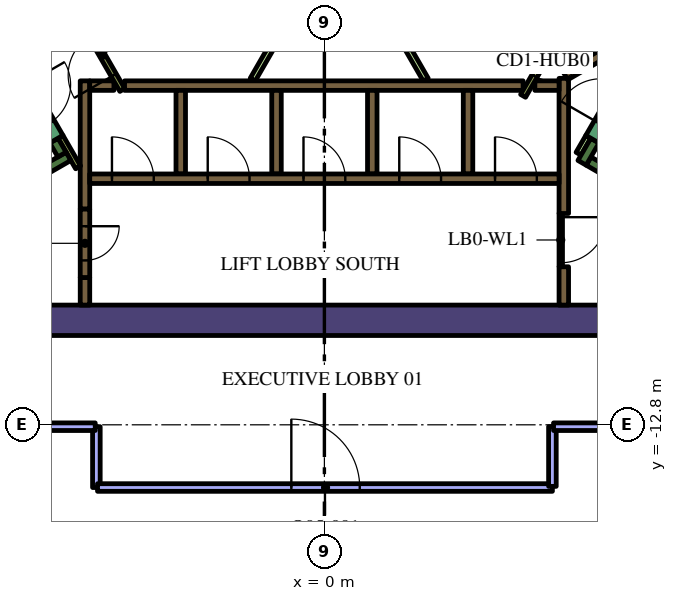
"""IFC4 building model, lengths in metres.
Left out: names, types, materials, properties, quantities, classifications, styles, units other than length and angle.
Written with IfcOpenShell. Run it as: python <this file> out.ifc"""

import sys

from ifc_helpers import new_model, si_unit, direction, frame, frame_2d, origin, place, context, subcontext, project, spatial, rectangle, extrude, element, fill, save


model = new_model("IFC4")
c1 = context("Model", 3, precision=1e-05, world=origin(), true_north=direction((0.0, 1.0)))
c2 = subcontext(c1, "Body", "Model", "MODEL_VIEW")
j1 = project(units=[si_unit("LENGTHUNIT", "METRE"), si_unit("PLANEANGLEUNIT", "RADIAN")], contexts=[c1])
p1 = place(None, origin())
s1 = spatial("IfcSite", under=j1, at=p1, CompositionType="ELEMENT")
p2 = place(p1, origin())
s2 = spatial("IfcBuilding", under=s1, at=p2, CompositionType="ELEMENT")
p3 = place(p2, frame((0.0, 0.0, 192.0)))
s3 = spatial("IfcBuildingStorey", under=s2, at=p3, CompositionType="ELEMENT", Elevation=192.0)
p4 = place(p3, frame((-13.378, -10.05, 0.0), z_axis=(0.0, 0.0, 1.0), x_axis=(1.0, 0.0, 0.0)))
e1 = element("IfcWall", 1, at=p4, inside=s3, PredefinedType="SOLIDWALL", context=c2, shape_type="SweptSolid", body=[
    extrude(rectangle(XDim=22.282, YDim=0.8, at=frame_2d((11.141, 0.0))), origin(), (0.0, 0.0, 1.0), 4.2),
])
p5 = place(p3, frame((12.84, -9.261, 0.0), z_axis=(0.0, 0.0, 1.0), x_axis=(-0.866013990052, 0.500019768644, 0.0)))
e2 = element("IfcWall", 2, at=p5, inside=s3, PredefinedType="SOLIDWALL", context=c2, shape_type="SweptSolid", body=[
    extrude(rectangle(XDim=6.8, YDim=0.25, at=frame_2d((3.4, 0.0))), origin(), (0.0, 0.0, 1.0), 4.2),
])
p6 = place(p3, frame((6.78, -5.906, 0.0), z_axis=(0.0, 0.0, 1.0), x_axis=(0.500223362819, 0.865896406789, 0.0)))
e3 = element("IfcWall", 3, at=p6, inside=s3, PredefinedType="SOLIDWALL", context=c2, shape_type="SweptSolid", body=[
    extrude(rectangle(XDim=0.675, YDim=0.25, at=frame_2d((0.337, 0.0))), origin(), (0.0, 0.0, 1.0), 4.2),
])
p7 = place(p3, frame((-12.84, -9.261, 0.0), z_axis=(0.0, 0.0, 1.0), x_axis=(0.866016039709, 0.500016218704, 0.0)))
e4 = element("IfcWall", 4, at=p7, inside=s3, PredefinedType="SOLIDWALL", context=c2, shape_type="SweptSolid", body=[
    extrude(rectangle(XDim=7.05, YDim=0.25, at=frame_2d((3.525, 0.0))), origin(), (0.0, 0.0, 1.0), 4.2),
])
p8 = place(p3, frame((-6.905, -5.69, 0.0), z_axis=(0.0, 0.0, 1.0), x_axis=(-0.500402024738, 0.865793170242, 0.0)))
e5 = element("IfcWall", 5, at=p8, inside=s3, PredefinedType="SOLIDWALL", context=c2, shape_type="SweptSolid", body=[
    extrude(rectangle(XDim=0.425, YDim=0.25, at=frame_2d((0.212, 0.0))), origin(), (0.0, 0.0, 1.0), 4.2),
])
p9 = place(p3, frame((-6.3, -8.925, 0.0), z_axis=(0.0, 0.0, 1.0), x_axis=(0.0, -1.0, 0.0)))
e6 = element("IfcWall", 6, at=p9, inside=s3, PredefinedType="SOLIDWALL", context=c2, shape_type="SweptSolid", body=[
    extrude(rectangle(XDim=0.725, YDim=0.25, at=frame_2d((0.363, 0.0))), origin(), (0.0, 0.0, 1.0), 4.2),
])
p10 = place(p3, frame((-5.259, -3.875, 0.0), z_axis=(0.0, 0.0, 1.0), x_axis=(1.0, 0.0, 0.0)))
e7 = element("IfcWall", 7, at=p10, inside=s3, PredefinedType="SOLIDWALL", context=c2, shape_type="SweptSolid", body=[
    extrude(rectangle(XDim=10.489, YDim=0.25, at=frame_2d((5.244, 0.0))), origin(), (0.0, 0.0, 1.0), 4.2),
])
for number, where, z_axis, x_axis in (
    (8, (3.78, -4.0, 0.0), (0.0, 0.0, 1.0), (0.0, -1.0, 0.0)),
    (9, (1.26, -4.0, 0.0), (0.0, 0.0, 1.0), (0.0, -1.0, 0.0)),
    (10, (-1.26, -4.0, 0.0), (0.0, 0.0, 1.0), (0.0, -1.0, 0.0)),
    (11, (-3.78, -4.0, 0.0), (0.0, 0.0, 1.0), (0.0, -1.0, 0.0)),
):
    element("IfcWall", number, at=place(p3, frame(where, z_axis=z_axis, x_axis=x_axis)), inside=s3, PredefinedType="SOLIDWALL", context=c2, shape_type="SweptSolid", body=[
        extrude(rectangle(XDim=2.2, YDim=0.25, at=frame_2d((1.1, 0.0))), origin(), (0.0, 0.0, 1.0), 4.2),
    ])
p11 = place(p3, frame((-6.3, -7.125, 0.0), z_axis=(0.0, 0.0, 1.0), x_axis=(0.0, 1.0, 0.0)))
e12 = element("IfcWall", 12, at=p11, inside=s3, PredefinedType="SOLIDWALL", context=c2, shape_type="SweptSolid", body=[
    extrude(rectangle(XDim=3.375, YDim=0.25, at=frame_2d((1.687, 0.0))), origin(), (0.0, 0.0, 1.0), 4.2),
])
p12 = place(p3, frame((-6.175, -3.875, 0.0), z_axis=(0.0, 0.0, 1.0), x_axis=(1.0, 0.0, 0.0)))
e13 = element("IfcWall", 13, at=p12, inside=s3, PredefinedType="SOLIDWALL", context=c2, shape_type="SweptSolid", body=[
    extrude(rectangle(XDim=0.637, YDim=0.25, at=frame_2d((0.318, 0.0))), origin(), (0.0, 0.0, 1.0), 4.2),
])
p13 = place(p3, frame((6.3, -7.24, 0.0), z_axis=(0.0, 0.0, 1.0), x_axis=(0.0, 1.0, 0.0)))
e14 = element("IfcWall", 14, at=p13, inside=s3, PredefinedType="SOLIDWALL", context=c2, shape_type="SweptSolid", body=[
    extrude(rectangle(XDim=3.556, YDim=0.25, at=frame_2d((1.778, 0.0))), origin(), (0.0, 0.0, 1.0), 4.2),
])
p14 = place(p3, frame((6.3, -9.65, 0.0), z_axis=(0.0, 0.0, 1.0), x_axis=(0.0, 1.0, 0.0)))
e15 = element("IfcWall", 15, at=p14, inside=s3, PredefinedType="SOLIDWALL", context=c2, shape_type="SweptSolid", body=[
    extrude(rectangle(XDim=1.008, YDim=0.25, at=frame_2d((0.504, 0.0))), origin(), (0.0, 0.0, 1.0), 4.2),
])
p15 = place(p3, frame((5.538, -3.875, 0.0), z_axis=(0.0, 0.0, 1.0), x_axis=(1.0, 0.0, 0.0)))
e16 = element("IfcWall", 16, at=p15, inside=s3, PredefinedType="SOLIDWALL", context=c2, shape_type="SweptSolid", body=[
    extrude(rectangle(XDim=0.637, YDim=0.25, at=frame_2d((0.318, 0.0))), origin(), (0.0, 0.0, 1.0), 4.2),
])
p16 = place(p3, frame((9.19, -1.969, 0.0), z_axis=(0.0, 0.0, 1.0), x_axis=(-0.866057109641, -0.499945079824, 0.0)))
e17 = element("IfcWall", 17, at=p16, inside=s3, PredefinedType="SOLIDWALL", context=c2, shape_type="SweptSolid", body=[
    extrude(rectangle(XDim=3.291, YDim=0.25, at=frame_2d((1.646, 0.0))), origin(), (0.0, 0.0, 1.0), 4.2),
])
p17 = place(p3, frame((6.13, -2.867, 0.0), z_axis=(0.0, 0.0, 1.0), x_axis=(0.500160776593, -0.865932559475, 0.0)))
e18 = element("IfcWall", 18, at=p17, inside=s3, PredefinedType="SOLIDWALL", context=c2, shape_type="SweptSolid", body=[
    extrude(rectangle(XDim=0.627, YDim=0.25, at=frame_2d((0.313, 0.0))), origin(), (0.0, 0.0, 1.0), 4.2),
])
p18 = place(p3, frame((-6.48, -6.027, 0.0), z_axis=(0.0, 0.0, 1.0), x_axis=(-0.499927229454, 0.866067413802, 0.0)))
e19 = element("IfcWall", 19, at=p18, inside=s3, PredefinedType="PARTITIONING", context=c2, shape_type="SweptSolid", body=[
    extrude(rectangle(XDim=0.929, YDim=0.15, at=frame_2d((0.464, 0.0))), origin(), (0.0, 0.0, 1.0), 4.2),
])
p19 = place(p3, frame((6.945, -5.222, 0.0), z_axis=(0.0, 0.0, 1.0), x_axis=(-0.499818422106, -0.866130212453, 0.0)))
e20 = element("IfcWall", 20, at=p19, inside=s3, PredefinedType="PARTITIONING", context=c2, shape_type="SweptSolid", body=[
    extrude(rectangle(XDim=0.514, YDim=0.15, at=frame_2d((0.257, 0.0))), origin(), (0.0, 0.0, 1.0), 3.1),
])
p20 = place(p3, frame((-1.887, 4.168, 0.0), z_axis=(0.0, 0.0, 1.0), x_axis=(0.499997069472, -0.866027095719, 0.0)))
e21 = element("IfcWall", 21, at=p20, inside=s3, PredefinedType="PARTITIONING", context=c2, shape_type="SweptSolid", body=[
    extrude(rectangle(XDim=9.106, YDim=0.15, at=frame_2d((4.553, 0.0))), origin(), (0.0, 0.0, 1.0), 3.1),
])
p21 = place(p3, frame((-1.887, -3.718, 0.0), z_axis=(0.0, 0.0, 1.0), x_axis=(0.500033191285, 0.866006239939, 0.0)))
e22 = element("IfcWall", 22, at=p21, inside=s3, PredefinedType="PARTITIONING", context=c2, shape_type="SweptSolid", body=[
    extrude(rectangle(XDim=1.315, YDim=0.15, at=frame_2d((0.657, 0.0))), origin(), (0.0, 0.0, 1.0), 3.1),
])
p22 = place(p3, frame((-6.175, -6.325, 0.0), z_axis=(0.0, 0.0, 1.0), x_axis=(1.0, 0.0, 0.0)))
e23 = element("IfcWall", 23, at=p22, inside=s3, PredefinedType="SOLIDWALL", context=c2, shape_type="SweptSolid", body=[
    extrude(rectangle(XDim=12.35, YDim=0.25, at=frame_2d((6.175, 0.0))), origin(), (0.0, 0.0, 1.0), 4.2),
])
p23 = place(p22, frame((0.585, 0.0, 0.0)))
e24 = element("IfcOpeningElement", 24, at=p23, cuts=e23, PredefinedType="OPENING", context=c2, shape_type="SweptSolid", body=[
    extrude(rectangle(XDim=1.1, YDim=2.1, at=frame_2d((0.55, 1.05))), frame((0.0, 0.135, 0.0), z_axis=(0.0, -1.0, 0.0), x_axis=(1.0, 0.0, 0.0)), (0.0, 0.0, 1.0), 0.27),
])
p24 = place(p22, frame((3.105, 0.0, 0.0)))
e25 = element("IfcOpeningElement", 25, at=p24, cuts=e23, PredefinedType="OPENING", context=c2, shape_type="SweptSolid", body=[
    extrude(rectangle(XDim=1.1, YDim=2.1, at=frame_2d((0.55, 1.05))), frame((0.0, 0.135, 0.0), z_axis=(0.0, -1.0, 0.0), x_axis=(1.0, 0.0, 0.0)), (0.0, 0.0, 1.0), 0.27),
])
p25 = place(p22, frame((5.625, 0.0, 0.0)))
e26 = element("IfcOpeningElement", 26, at=p25, cuts=e23, PredefinedType="OPENING", context=c2, shape_type="SweptSolid", body=[
    extrude(rectangle(XDim=1.1, YDim=2.1, at=frame_2d((0.55, 1.05))), frame((0.0, 0.135, 0.0), z_axis=(0.0, -1.0, 0.0), x_axis=(1.0, 0.0, 0.0)), (0.0, 0.0, 1.0), 0.27),
])
p26 = place(p22, frame((8.145, 0.0, 0.0)))
e27 = element("IfcOpeningElement", 27, at=p26, cuts=e23, PredefinedType="OPENING", context=c2, shape_type="SweptSolid", body=[
    extrude(rectangle(XDim=1.1, YDim=2.1, at=frame_2d((0.55, 1.05))), frame((0.0, 0.135, 0.0), z_axis=(0.0, -1.0, 0.0), x_axis=(1.0, 0.0, 0.0)), (0.0, 0.0, 1.0), 0.27),
])
p27 = place(p22, frame((10.665, 0.0, 0.0)))
e28 = element("IfcOpeningElement", 28, at=p27, cuts=e23, PredefinedType="OPENING", context=c2, shape_type="SweptSolid", body=[
    extrude(rectangle(XDim=1.1, YDim=2.1, at=frame_2d((0.55, 1.05))), frame((0.0, 0.135, 0.0), z_axis=(0.0, -1.0, 0.0), x_axis=(1.0, 0.0, 0.0)), (0.0, 0.0, 1.0), 0.27),
])
p28 = place(p3, frame((7.053, -5.284, 0.0), z_axis=(0.0, 0.0, 1.0), x_axis=(0.500078061341, 0.865980330357, 0.0)))
e29 = element("IfcWall", 29, at=p28, inside=s3, PredefinedType="SOLIDWALL", context=c2, shape_type="SweptSolid", body=[
    extrude(rectangle(XDim=2.1, YDim=0.4, at=frame_2d((1.05, 0.0))), origin(), (0.0, 0.0, 1.0), 4.2),
])
p29 = place(p28, frame((0.45, 0.0, 0.0)))
e30 = element("IfcOpeningElement", 30, at=p29, cuts=e29, PredefinedType="OPENING", context=c2, shape_type="SweptSolid", body=[
    extrude(rectangle(XDim=1.2, YDim=2.1, at=frame_2d((0.6, 1.05))), frame((0.0, 0.21, 0.0), z_axis=(0.0, -1.0, 0.0), x_axis=(1.0, 0.0, 0.0)), (0.0, 0.0, 1.0), 0.42),
])
p30 = place(p3, frame((-8.103, -3.466, 0.0), z_axis=(0.0, 0.0, 1.0), x_axis=(0.500078061341, -0.865980330357, 0.0)))
e31 = element("IfcWall", 31, at=p30, inside=s3, PredefinedType="SOLIDWALL", context=c2, shape_type="SweptSolid", body=[
    extrude(rectangle(XDim=2.1, YDim=0.4, at=frame_2d((1.05, 0.0))), origin(), (0.0, 0.0, 1.0), 4.2),
])
p31 = place(p30, frame((0.45, 0.0, 0.0)))
e32 = element("IfcOpeningElement", 32, at=p31, cuts=e31, PredefinedType="OPENING", context=c2, shape_type="SweptSolid", body=[
    extrude(rectangle(XDim=1.2, YDim=2.1, at=frame_2d((0.6, 1.05))), frame((0.0, 0.21, 0.0), z_axis=(0.0, -1.0, 0.0), x_axis=(1.0, 0.0, 0.0)), (0.0, 0.0, 1.0), 0.42),
])
p32 = place(p3, frame((-6.3, -7.125, 0.0), z_axis=(0.0, 0.0, 1.0), x_axis=(0.0, -1.0, 0.0)))
e33 = element("IfcWall", 33, at=p32, inside=s3, PredefinedType="SOLIDWALL", context=c2, shape_type="SweptSolid", body=[
    extrude(rectangle(XDim=1.8, YDim=0.25, at=frame_2d((0.9, 0.0))), origin(), (0.0, 0.0, 1.0), 4.2),
])
p33 = place(p32, frame((0.45, 0.0, 0.0)))
e34 = element("IfcOpeningElement", 34, at=p33, cuts=e33, PredefinedType="OPENING", context=c2, shape_type="SweptSolid", body=[
    extrude(rectangle(XDim=0.9, YDim=2.1, at=frame_2d((0.45, 1.05))), frame((0.0, 0.135, 0.0), z_axis=(0.0, -1.0, 0.0), x_axis=(1.0, 0.0, 0.0)), (0.0, 0.0, 1.0), 0.27),
])
p34 = place(p3, frame((6.203, -2.456, 0.0), z_axis=(0.0, 0.0, 1.0), x_axis=(-0.500043961785, -0.866000020948, 0.0)))
e35 = element("IfcWall", 35, at=p34, inside=s3, PredefinedType="PARTITIONING", context=c2, shape_type="SweptSolid", body=[
    extrude(rectangle(XDim=1.95, YDim=0.15, at=frame_2d((0.975, 0.0))), origin(), (0.0, 0.0, 1.0), 4.2),
])
p35 = place(p34, frame((0.45, 0.0, 0.0)))
e36 = element("IfcOpeningElement", 36, at=p35, cuts=e35, PredefinedType="OPENING", context=c2, shape_type="SweptSolid", body=[
    extrude(rectangle(XDim=0.9, YDim=2.1, at=frame_2d((0.45, 1.05))), frame((0.0, 0.085, 0.0), z_axis=(0.0, -1.0, 0.0), x_axis=(1.0, 0.0, 0.0)), (0.0, 0.0, 1.0), 0.17),
])
p36 = place(p3, frame((-5.317, -3.99, 0.0), z_axis=(0.0, 0.0, 1.0), x_axis=(-0.500027713859, 0.866009402589, 0.0)))
e37 = element("IfcWall", 37, at=p36, inside=s3, PredefinedType="PARTITIONING", context=c2, shape_type="SweptSolid", body=[
    extrude(rectangle(XDim=2.1, YDim=0.15, at=frame_2d((1.05, 0.0))), origin(), (0.0, 0.0, 1.0), 4.2),
])
p37 = place(p36, frame((0.45, 0.0, 0.0)))
e38 = element("IfcOpeningElement", 38, at=p37, cuts=e37, PredefinedType="OPENING", context=c2, shape_type="SweptSolid", body=[
    extrude(rectangle(XDim=1.2, YDim=2.1, at=frame_2d((0.6, 1.05))), frame((0.0, 0.085, 0.0), z_axis=(0.0, -1.0, 0.0), x_axis=(1.0, 0.0, 0.0)), (0.0, 0.0, 1.0), 0.17),
])
p38 = place(p3, frame((6.22, -7.237, 0.0), z_axis=(0.0, 0.0, 1.0), x_axis=(0.0, -1.0, 0.0)))
e39 = element("IfcWall", 39, at=p38, inside=s3, PredefinedType="PARTITIONING", context=c2, shape_type="SweptSolid", body=[
    extrude(rectangle(XDim=1.4, YDim=0.09, at=frame_2d((0.7, 0.0))), origin(), (0.0, 0.0, 1.0), 3.1),
])
p39 = place(p38, frame((0.1, 0.0, 0.0)))
e40 = element("IfcOpeningElement", 40, at=p39, cuts=e39, PredefinedType="OPENING", context=c2, shape_type="SweptSolid", body=[
    extrude(rectangle(XDim=1.2, YDim=2.1, at=frame_2d((0.6, 1.05))), frame((0.0, 0.055, 0.0), z_axis=(0.0, -1.0, 0.0), x_axis=(1.0, 0.0, 0.0)), (0.0, 0.0, 1.0), 0.11),
])
p40 = place(p3, frame((-6.0, -12.85, 0.0), z_axis=(0.0, 0.0, 1.0), x_axis=(0.0, -1.0, 0.0)))
e41 = element("IfcWall", 41, at=p40, inside=s3, PredefinedType="PARTITIONING", context=c2, shape_type="SweptSolid", body=[
    extrude(rectangle(XDim=1.6, YDim=0.2, at=frame_2d((0.8, 0.0))), origin(), (0.0, 0.0, 1.0), 3.1),
])
p41 = place(p3, frame((-5.97, -14.45, 0.0), z_axis=(0.0, 0.0, 1.0), x_axis=(1.0, 0.0, 0.0)))
e42 = element("IfcWall", 42, at=p41, inside=s3, PredefinedType="PARTITIONING", context=c2, shape_type="SweptSolid", body=[
    extrude(rectangle(XDim=11.97, YDim=0.2, at=frame_2d((5.985, 0.0))), origin(), (0.0, 0.0, 1.0), 3.1),
])
p42 = place(p41, frame((5.1, 0.0, 0.0)))
e43 = element("IfcOpeningElement", 43, at=p42, cuts=e42, PredefinedType="OPENING", context=c2, shape_type="SweptSolid", body=[
    extrude(rectangle(XDim=1.8, YDim=2.1, at=frame_2d((0.9, 1.05))), frame((0.0, 0.11, 0.0), z_axis=(0.0, -1.0, 0.0), x_axis=(1.0, 0.0, 0.0)), (0.0, 0.0, 1.0), 0.22),
])
p43 = place(p3, frame((6.0, -14.42, 0.0), z_axis=(0.0, 0.0, 1.0), x_axis=(0.0, 1.0, 0.0)))
e44 = element("IfcWall", 44, at=p43, inside=s3, PredefinedType="PARTITIONING", context=c2, shape_type="SweptSolid", body=[
    extrude(rectangle(XDim=1.57, YDim=0.2, at=frame_2d((0.785, 0.0))), origin(), (0.0, 0.0, 1.0), 3.1),
])
for number, where, z_axis, x_axis in (
    (45, (-13.924, -12.85, 0.0), (0.0, 0.0, 1.0), (1.0, 0.0, 0.0)),
    (46, (6.03, -12.85, 0.0), (0.0, 0.0, 1.0), (1.0, 0.0, 0.0)),
):
    element("IfcWall", number, at=place(p3, frame(where, z_axis=z_axis, x_axis=x_axis)), inside=s3, PredefinedType="PARTITIONING", context=c2, shape_type="SweptSolid", body=[
        extrude(rectangle(XDim=7.894, YDim=0.2, at=frame_2d((3.947, 0.0))), origin(), (0.0, 0.0, 1.0), 3.1),
    ])
p44 = place(p23, origin())
e47 = element("IfcDoor", 47, at=p44, inside=s3, OperationType="DOUBLE_DOOR_SLIDING", PredefinedType="DOOR", context=c2, shape_type="SweptSolid", body=[
    extrude(rectangle(XDim=1.1, YDim=2.1, at=frame_2d((0.55, 1.05))), frame((0.0, 0.025, 0.0), z_axis=(0.0, -1.0, 0.0), x_axis=(1.0, 0.0, 0.0)), (0.0, 0.0, 1.0), 0.05),
])
fill(e24, e47)
p45 = place(p24, origin())
e48 = element("IfcDoor", 48, at=p45, inside=s3, OperationType="DOUBLE_DOOR_SLIDING", PredefinedType="DOOR", context=c2, shape_type="SweptSolid", body=[
    extrude(rectangle(XDim=1.1, YDim=2.1, at=frame_2d((0.55, 1.05))), frame((0.0, 0.025, 0.0), z_axis=(0.0, -1.0, 0.0), x_axis=(1.0, 0.0, 0.0)), (0.0, 0.0, 1.0), 0.05),
])
fill(e25, e48)
p46 = place(p25, origin())
e49 = element("IfcDoor", 49, at=p46, inside=s3, OperationType="DOUBLE_DOOR_SLIDING", PredefinedType="DOOR", context=c2, shape_type="SweptSolid", body=[
    extrude(rectangle(XDim=1.1, YDim=2.1, at=frame_2d((0.55, 1.05))), frame((0.0, 0.025, 0.0), z_axis=(0.0, -1.0, 0.0), x_axis=(1.0, 0.0, 0.0)), (0.0, 0.0, 1.0), 0.05),
])
fill(e26, e49)
p47 = place(p26, origin())
e50 = element("IfcDoor", 50, at=p47, inside=s3, OperationType="DOUBLE_DOOR_SLIDING", PredefinedType="DOOR", context=c2, shape_type="SweptSolid", body=[
    extrude(rectangle(XDim=1.1, YDim=2.1, at=frame_2d((0.55, 1.05))), frame((0.0, 0.025, 0.0), z_axis=(0.0, -1.0, 0.0), x_axis=(1.0, 0.0, 0.0)), (0.0, 0.0, 1.0), 0.05),
])
fill(e27, e50)
p48 = place(p27, origin())
e51 = element("IfcDoor", 51, at=p48, inside=s3, OperationType="DOUBLE_DOOR_SLIDING", PredefinedType="DOOR", context=c2, shape_type="SweptSolid", body=[
    extrude(rectangle(XDim=1.1, YDim=2.1, at=frame_2d((0.55, 1.05))), frame((0.0, 0.025, 0.0), z_axis=(0.0, -1.0, 0.0), x_axis=(1.0, 0.0, 0.0)), (0.0, 0.0, 1.0), 0.05),
])
fill(e28, e51)
p49 = place(p33, origin())
e52 = element("IfcDoor", 52, at=p49, inside=s3, OperationType="SINGLE_SWING_LEFT", PredefinedType="DOOR", context=c2, shape_type="SweptSolid", body=[
    extrude(rectangle(XDim=0.9, YDim=2.1, at=frame_2d((0.45, 1.05))), frame((0.0, 0.025, 0.0), z_axis=(0.0, -1.0, 0.0), x_axis=(1.0, 0.0, 0.0)), (0.0, 0.0, 1.0), 0.05),
])
fill(e34, e52)
p50 = place(p35, origin())
e53 = element("IfcDoor", 53, at=p50, inside=s3, OperationType="SINGLE_SWING_LEFT", PredefinedType="DOOR", context=c2, shape_type="SweptSolid", body=[
    extrude(rectangle(XDim=0.9, YDim=2.1, at=frame_2d((0.45, 1.05))), frame((0.0, 0.025, 0.0), z_axis=(0.0, -1.0, 0.0), x_axis=(1.0, 0.0, 0.0)), (0.0, 0.0, 1.0), 0.05),
])
fill(e36, e53)
p51 = place(p37, origin())
e54 = element("IfcDoor", 54, at=p51, inside=s3, OperationType="SINGLE_SWING_LEFT", PredefinedType="DOOR", context=c2, shape_type="SweptSolid", body=[
    extrude(rectangle(XDim=1.2, YDim=2.1, at=frame_2d((0.6, 1.05))), frame((0.0, 0.025, 0.0), z_axis=(0.0, -1.0, 0.0), x_axis=(1.0, 0.0, 0.0)), (0.0, 0.0, 1.0), 0.05),
])
fill(e38, e54)
p52 = place(p39, origin())
e55 = element("IfcDoor", 55, at=p52, inside=s3, OperationType="SINGLE_SWING_LEFT", PredefinedType="DOOR", context=c2, shape_type="SweptSolid", body=[
    extrude(rectangle(XDim=1.2, YDim=2.1, at=frame_2d((0.6, 1.05))), frame((0.0, 0.025, 0.0), z_axis=(0.0, -1.0, 0.0), x_axis=(1.0, 0.0, 0.0)), (0.0, 0.0, 1.0), 0.05),
])
fill(e40, e55)
p53 = place(p42, origin())
e56 = element("IfcDoor", 56, at=p53, inside=s3, OperationType="DOUBLE_DOOR_SINGLE_SWING", PredefinedType="DOOR", context=c2, shape_type="SweptSolid", body=[
    extrude(rectangle(XDim=1.8, YDim=2.1, at=frame_2d((0.9, 1.05))), frame((0.0, 0.025, 0.0), z_axis=(0.0, -1.0, 0.0), x_axis=(1.0, 0.0, 0.0)), (0.0, 0.0, 1.0), 0.05),
])
fill(e43, e56)
save(model, sys.argv[1])
